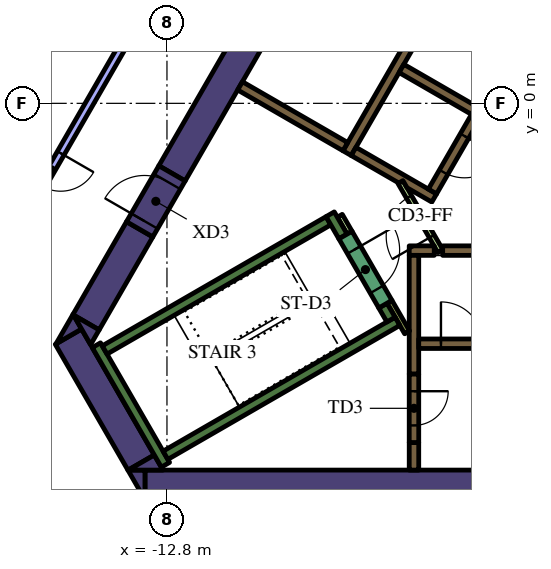
"""IFC4 building model, lengths in metres.
Left out: names, types, materials, properties, quantities, classifications, styles, units other than length and angle.
Written with IfcOpenShell. Run it as: python <this file> out.ifc"""

import sys

from ifc_helpers import new_model, si_unit, direction, frame, frame_2d, origin, place, context, subcontext, project, spatial, polyline, rectangle, outline, extrude, element, fill, save


model = new_model("IFC4")
c1 = context("Model", 3, precision=1e-05, world=origin(), true_north=direction((0.0, 1.0)))
c2 = subcontext(c1, "Body", "Model", "MODEL_VIEW")
j1 = project(units=[si_unit("LENGTHUNIT", "METRE"), si_unit("PLANEANGLEUNIT", "RADIAN")], contexts=[c1])
p1 = place(None, origin())
s1 = spatial("IfcSite", under=j1, at=p1, CompositionType="ELEMENT")
p2 = place(p1, origin())
s2 = spatial("IfcBuilding", under=s1, at=p2, CompositionType="ELEMENT")
p3 = place(p2, frame((0.0, 0.0, 171.0)))
s3 = spatial("IfcBuildingStorey", under=s2, at=p3, CompositionType="ELEMENT", Elevation=171.0)
p4 = place(p3, frame((-13.378, -10.05, 0.0), z_axis=(0.0, 0.0, 1.0), x_axis=(1.0, 0.0, 0.0)))
e1 = element("IfcWall", 1, at=p4, inside=s3, PredefinedType="SOLIDWALL", context=c2, shape_type="SweptSolid", body=[
    extrude(rectangle(XDim=22.282, YDim=0.8, at=frame_2d((11.141, 0.0))), origin(), (0.0, 0.0, 1.0), 4.2),
])
p5 = place(p3, origin())
e2 = element("IfcWall", 2, at=p5, inside=s3, PredefinedType="SOLIDWALL", context=c2, shape_type="SweptSolid", body=[
    extrude(outline(polyline([(-13.828, -9.65), (-13.38, -9.65), (-13.38, -10.426), (-13.828, -9.65)])), origin(), (0.0, 0.0, 1.0), 4.2),
])
p6 = place(p3, frame((-15.392, -6.14, 0.0), z_axis=(0.0, 0.0, 1.0), x_axis=(0.499984020225, -0.866034629516, 0.0)))
e3 = element("IfcWall", 3, at=p6, inside=s3, PredefinedType="SOLIDWALL", context=c2, shape_type="SweptSolid", body=[
    extrude(rectangle(XDim=3.824, YDim=0.8, at=frame_2d((1.912, 0.0))), origin(), (0.0, 0.0, 1.0), 4.2),
])
e4 = element("IfcWall", 4, at=p5, inside=s3, PredefinedType="SOLIDWALL", context=c2, shape_type="SweptSolid", body=[
    extrude(outline(polyline([(-15.047, -5.938), (-15.719, -6.326), (-15.271, -5.55), (-15.047, -5.938)])), origin(), (0.0, 0.0, 1.0), 4.2),
])
e5 = element("IfcWall", 5, at=p5, inside=s3, PredefinedType="SOLIDWALL", context=c2, shape_type="SweptSolid", body=[
    extrude(outline(polyline([(-12.904, -9.65), (-13.82, -9.65), (-13.133, -9.253), (-12.904, -9.65)])), origin(), (0.0, 0.0, 1.0), 4.2),
])
p7 = place(p3, frame((-13.518, -3.314, 0.0), z_axis=(0.0, 0.0, 1.0), x_axis=(-0.499969377405, -0.866043083026, 0.0)))
e6 = element("IfcWall", 6, at=p7, inside=s3, PredefinedType="SOLIDWALL", context=c2, shape_type="SweptSolid", body=[
    extrude(rectangle(XDim=2.824, YDim=0.8, at=frame_2d((1.412, 0.0))), origin(), (0.0, 0.0, 1.0), 4.2),
])
e7 = element("IfcWall", 7, at=p5, inside=s3, PredefinedType="SOLIDWALL", context=c2, shape_type="SweptSolid", body=[
    extrude(outline(polyline([(-14.809, -6.35), (-15.257, -5.574), (-14.585, -5.962), (-14.809, -6.35)])), origin(), (0.0, 0.0, 1.0), 4.2),
])
p8 = place(p3, frame((-12.668, -1.842, 0.0), z_axis=(0.0, 0.0, 1.0), x_axis=(0.500003640647, 0.866023301845, 0.0)))
e8 = element("IfcWall", 8, at=p8, inside=s3, PredefinedType="SOLIDWALL", context=c2, shape_type="SweptSolid", body=[
    extrude(rectangle(XDim=15.858, YDim=0.8, at=frame_2d((7.929, 0.0))), origin(), (0.0, 0.0, 1.0), 4.2),
])
p9 = place(p3, frame((-12.84, -9.511, 0.0), z_axis=(0.0, 0.0, 1.0), x_axis=(-0.499997733992, 0.866026712061, 0.0)))
e9 = element("IfcWall", 9, at=p9, inside=s3, PredefinedType="SOLIDWALL", context=c2, shape_type="SweptSolid", body=[
    extrude(rectangle(XDim=3.634, YDim=0.25, at=frame_2d((1.817, 0.0))), origin(), (0.0, 0.0, 1.0), 4.2),
])
p10 = place(p3, frame((-14.44, -6.49, 0.0), z_axis=(0.0, 0.0, 1.0), x_axis=(0.866022966069, 0.500004222222, 0.0)))
e10 = element("IfcWall", 10, at=p10, inside=s3, PredefinedType="SOLIDWALL", context=c2, shape_type="SweptSolid", body=[
    extrude(rectangle(XDim=6.8, YDim=0.25, at=frame_2d((3.4, 0.0))), origin(), (0.0, 0.0, 1.0), 4.2),
])
p11 = place(p3, frame((-8.168, -3.503, 0.0), z_axis=(0.0, 0.0, 1.0), x_axis=(-0.499952099219, 0.866053057547, 0.0)))
e11 = element("IfcWall", 11, at=p11, inside=s3, PredefinedType="SOLIDWALL", context=c2, shape_type="SweptSolid", body=[
    extrude(rectangle(XDim=0.675, YDim=0.25, at=frame_2d((0.337, 0.0))), origin(), (0.0, 0.0, 1.0), 4.2),
])
p12 = place(p3, frame((-12.84, -9.261, 0.0), z_axis=(0.0, 0.0, 1.0), x_axis=(0.866016039709, 0.500016218704, 0.0)))
e12 = element("IfcWall", 12, at=p12, inside=s3, PredefinedType="SOLIDWALL", context=c2, shape_type="SweptSolid", body=[
    extrude(rectangle(XDim=7.05, YDim=0.25, at=frame_2d((3.525, 0.0))), origin(), (0.0, 0.0, 1.0), 4.2),
])
p13 = place(p3, frame((-6.905, -5.69, 0.0), z_axis=(0.0, 0.0, 1.0), x_axis=(-0.500402024738, 0.865793170242, 0.0)))
e13 = element("IfcWall", 13, at=p13, inside=s3, PredefinedType="SOLIDWALL", context=c2, shape_type="SweptSolid", body=[
    extrude(rectangle(XDim=0.425, YDim=0.25, at=frame_2d((0.212, 0.0))), origin(), (0.0, 0.0, 1.0), 4.2),
])
p14 = place(p3, frame((-6.3, -8.925, 0.0), z_axis=(0.0, 0.0, 1.0), x_axis=(0.0, -1.0, 0.0)))
e14 = element("IfcWall", 14, at=p14, inside=s3, PredefinedType="SOLIDWALL", context=c2, shape_type="SweptSolid", body=[
    extrude(rectangle(XDim=0.725, YDim=0.25, at=frame_2d((0.363, 0.0))), origin(), (0.0, 0.0, 1.0), 4.2),
])
p15 = place(p3, frame((-5.545, -3.875, 0.0), z_axis=(0.0, 0.0, 1.0), x_axis=(1.0, 0.0, 0.0)))
e15 = element("IfcWall", 15, at=p15, inside=s3, PredefinedType="SOLIDWALL", context=c2, shape_type="SweptSolid", body=[
    extrude(rectangle(XDim=11.97, YDim=0.25, at=frame_2d((5.985, 0.0))), origin(), (0.0, 0.0, 1.0), 4.2),
])
p16 = place(p3, frame((-6.425, -3.875, 0.0), z_axis=(0.0, 0.0, 1.0), x_axis=(1.0, 0.0, 0.0)))
e16 = element("IfcWall", 16, at=p16, inside=s3, PredefinedType="SOLIDWALL", context=c2, shape_type="SweptSolid", body=[
    extrude(rectangle(XDim=0.658, YDim=0.25, at=frame_2d((0.329, 0.0))), origin(), (0.0, 0.0, 1.0), 4.2),
])
p17 = place(p3, frame((-6.3, -7.125, 0.0), z_axis=(0.0, 0.0, 1.0), x_axis=(0.0, 1.0, 0.0)))
e17 = element("IfcWall", 17, at=p17, inside=s3, PredefinedType="SOLIDWALL", context=c2, shape_type="SweptSolid", body=[
    extrude(rectangle(XDim=3.125, YDim=0.25, at=frame_2d((1.562, 0.0))), origin(), (0.0, 0.0, 1.0), 4.2),
])
p18 = place(p3, frame((-8.06, -1.311, 0.0), z_axis=(0.0, 0.0, 1.0), x_axis=(0.50000273126, 0.866023826885, 0.0)))
e18 = element("IfcWall", 18, at=p18, inside=s3, PredefinedType="SOLIDWALL", context=c2, shape_type="SweptSolid", body=[
    extrude(rectangle(XDim=10.33, YDim=0.25, at=frame_2d((5.165, 0.0))), origin(), (0.0, 0.0, 1.0), 4.2),
])
p19 = place(p3, frame((-4.724, -0.182, 0.0), z_axis=(0.0, 0.0, 1.0), x_axis=(-0.866008176907, 0.50002983664, 0.0)))
e19 = element("IfcWall", 19, at=p19, inside=s3, PredefinedType="SOLIDWALL", context=c2, shape_type="SweptSolid", body=[
    extrude(rectangle(XDim=2.2, YDim=0.25, at=frame_2d((1.1, 0.0))), origin(), (0.0, 0.0, 1.0), 4.2),
])
e20 = element("IfcWall", 20, at=p5, inside=s3, PredefinedType="SOLIDWALL", context=c2, shape_type="SweptSolid", body=[
    extrude(outline(polyline([(-5.922, -2.257), (-5.922, -2.257), (-5.705, -2.382), (-5.83, -2.598), (-6.483, -2.221), (-6.591, -2.033), (-6.591, -2.033), (-6.7, -2.096), (-7.952, -1.373), (-7.827, -1.156), (-5.922, -2.257)])), origin(), (0.0, 0.0, 1.0), 4.2),
])
p20 = place(p3, frame((-8.106, -1.14, 0.0), z_axis=(0.0, 0.0, 1.0), x_axis=(-0.866008981251, 0.500028443584, 0.0)))
e21 = element("IfcWall", 21, at=p20, inside=s3, PredefinedType="SOLIDWALL", context=c2, shape_type="SweptSolid", body=[
    extrude(rectangle(XDim=3.2, YDim=0.25, at=frame_2d((1.6, 0.0))), origin(), (0.0, 0.0, 1.0), 4.2),
])
p21 = place(p3, frame((-8.252, -2.958, 0.0), z_axis=(0.0, 0.0, 1.0), x_axis=(0.500174715838, -0.865924508047, 0.0)))
e22 = element("IfcWall", 22, at=p21, inside=s3, PredefinedType="PARTITIONING", context=c2, shape_type="SweptSolid", body=[
    extrude(rectangle(XDim=0.514, YDim=0.15, at=frame_2d((0.257, 0.0))), origin(), (0.0, 0.0, 1.0), 3.15),
])
p22 = place(p3, frame((-6.48, -6.027, 0.0), z_axis=(0.0, 0.0, 1.0), x_axis=(-0.499927229454, 0.866067413802, 0.0)))
e23 = element("IfcWall", 23, at=p22, inside=s3, PredefinedType="PARTITIONING", context=c2, shape_type="SweptSolid", body=[
    extrude(rectangle(XDim=0.929, YDim=0.15, at=frame_2d((0.464, 0.0))), origin(), (0.0, 0.0, 1.0), 4.2),
])
p23 = place(p3, frame((-6.175, -6.325, 0.0), z_axis=(0.0, 0.0, 1.0), x_axis=(1.0, 0.0, 0.0)))
e24 = element("IfcWall", 24, at=p23, inside=s3, PredefinedType="SOLIDWALL", context=c2, shape_type="SweptSolid", body=[
    extrude(rectangle(XDim=12.35, YDim=0.25, at=frame_2d((6.175, 0.0))), origin(), (0.0, 0.0, 1.0), 4.2),
])
p24 = place(p23, frame((0.585, 0.0, 0.0)))
e25 = element("IfcOpeningElement", 25, at=p24, cuts=e24, PredefinedType="OPENING", context=c2, shape_type="SweptSolid", body=[
    extrude(rectangle(XDim=1.1, YDim=2.1, at=frame_2d((0.55, 1.05))), frame((0.0, 0.135, 0.0), z_axis=(0.0, -1.0, 0.0), x_axis=(1.0, 0.0, 0.0)), (0.0, 0.0, 1.0), 0.27),
])
p25 = place(p23, frame((3.105, 0.0, 0.0)))
e26 = element("IfcOpeningElement", 26, at=p25, cuts=e24, PredefinedType="OPENING", context=c2, shape_type="SweptSolid", body=[
    extrude(rectangle(XDim=1.1, YDim=2.1, at=frame_2d((0.55, 1.05))), frame((0.0, 0.135, 0.0), z_axis=(0.0, -1.0, 0.0), x_axis=(1.0, 0.0, 0.0)), (0.0, 0.0, 1.0), 0.27),
])
p26 = place(p23, frame((5.625, 0.0, 0.0)))
e27 = element("IfcOpeningElement", 27, at=p26, cuts=e24, PredefinedType="OPENING", context=c2, shape_type="SweptSolid", body=[
    extrude(rectangle(XDim=1.1, YDim=2.1, at=frame_2d((0.55, 1.05))), frame((0.0, 0.135, 0.0), z_axis=(0.0, -1.0, 0.0), x_axis=(1.0, 0.0, 0.0)), (0.0, 0.0, 1.0), 0.27),
])
p27 = place(p23, frame((8.145, 0.0, 0.0)))
e28 = element("IfcOpeningElement", 28, at=p27, cuts=e24, PredefinedType="OPENING", context=c2, shape_type="SweptSolid", body=[
    extrude(rectangle(XDim=1.1, YDim=2.1, at=frame_2d((0.55, 1.05))), frame((0.0, 0.135, 0.0), z_axis=(0.0, -1.0, 0.0), x_axis=(1.0, 0.0, 0.0)), (0.0, 0.0, 1.0), 0.27),
])
p28 = place(p23, frame((10.665, 0.0, 0.0)))
e29 = element("IfcOpeningElement", 29, at=p28, cuts=e24, PredefinedType="OPENING", context=c2, shape_type="SweptSolid", body=[
    extrude(rectangle(XDim=1.1, YDim=2.1, at=frame_2d((0.55, 1.05))), frame((0.0, 0.135, 0.0), z_axis=(0.0, -1.0, 0.0), x_axis=(1.0, 0.0, 0.0)), (0.0, 0.0, 1.0), 0.27),
])
p29 = place(p3, frame((-0.898, 6.194, 0.0), z_axis=(0.0, 0.0, 1.0), x_axis=(-0.499996202215, -0.866027596426, 0.0)))
e30 = element("IfcWall", 30, at=p29, inside=s3, PredefinedType="SOLIDWALL", context=c2, shape_type="SweptSolid", body=[
    extrude(rectangle(XDim=9.83, YDim=0.25, at=frame_2d((4.915, 0.0))), origin(), (0.0, 0.0, 1.0), 4.2),
])
p30 = place(p29, frame((0.585, 0.0, 0.0)))
e31 = element("IfcOpeningElement", 31, at=p30, cuts=e30, PredefinedType="OPENING", context=c2, shape_type="SweptSolid", body=[
    extrude(rectangle(XDim=1.1, YDim=2.1, at=frame_2d((0.55, 1.05))), frame((0.0, 0.135, 0.0), z_axis=(0.0, -1.0, 0.0), x_axis=(1.0, 0.0, 0.0)), (0.0, 0.0, 1.0), 0.27),
])
p31 = place(p29, frame((3.105, 0.0, 0.0)))
e32 = element("IfcOpeningElement", 32, at=p31, cuts=e30, PredefinedType="OPENING", context=c2, shape_type="SweptSolid", body=[
    extrude(rectangle(XDim=1.1, YDim=2.1, at=frame_2d((0.55, 1.05))), frame((0.0, 0.135, 0.0), z_axis=(0.0, -1.0, 0.0), x_axis=(1.0, 0.0, 0.0)), (0.0, 0.0, 1.0), 0.27),
])
p32 = place(p29, frame((5.625, 0.0, 0.0)))
e33 = element("IfcOpeningElement", 33, at=p32, cuts=e30, PredefinedType="OPENING", context=c2, shape_type="SweptSolid", body=[
    extrude(rectangle(XDim=1.1, YDim=2.1, at=frame_2d((0.55, 1.05))), frame((0.0, 0.135, 0.0), z_axis=(0.0, -1.0, 0.0), x_axis=(1.0, 0.0, 0.0)), (0.0, 0.0, 1.0), 0.27),
])
p33 = place(p29, frame((8.145, 0.0, 0.0)))
e34 = element("IfcOpeningElement", 34, at=p33, cuts=e30, PredefinedType="OPENING", context=c2, shape_type="SweptSolid", body=[
    extrude(rectangle(XDim=1.1, YDim=2.1, at=frame_2d((0.55, 1.05))), frame((0.0, 0.135, 0.0), z_axis=(0.0, -1.0, 0.0), x_axis=(1.0, 0.0, 0.0)), (0.0, 0.0, 1.0), 0.27),
])
p34 = place(p3, frame((-8.103, -3.466, 0.0), z_axis=(0.0, 0.0, 1.0), x_axis=(0.500078061341, -0.865980330357, 0.0)))
e35 = element("IfcWall", 35, at=p34, inside=s3, PredefinedType="SOLIDWALL", context=c2, shape_type="SweptSolid", body=[
    extrude(rectangle(XDim=2.1, YDim=0.4, at=frame_2d((1.05, 0.0))), origin(), (0.0, 0.0, 1.0), 4.2),
])
p35 = place(p34, frame((0.45, 0.0, 0.0)))
e36 = element("IfcOpeningElement", 36, at=p35, cuts=e35, PredefinedType="OPENING", context=c2, shape_type="SweptSolid", body=[
    extrude(rectangle(XDim=1.2, YDim=2.1, at=frame_2d((0.6, 1.05))), frame((0.0, 0.21, 0.0), z_axis=(0.0, -1.0, 0.0), x_axis=(1.0, 0.0, 0.0)), (0.0, 0.0, 1.0), 0.42),
])
p36 = place(p3, frame((-6.3, -7.125, 0.0), z_axis=(0.0, 0.0, 1.0), x_axis=(0.0, -1.0, 0.0)))
e37 = element("IfcWall", 37, at=p36, inside=s3, PredefinedType="SOLIDWALL", context=c2, shape_type="SweptSolid", body=[
    extrude(rectangle(XDim=1.8, YDim=0.25, at=frame_2d((0.9, 0.0))), origin(), (0.0, 0.0, 1.0), 4.2),
])
p37 = place(p36, frame((0.45, 0.0, 0.0)))
e38 = element("IfcOpeningElement", 38, at=p37, cuts=e37, PredefinedType="OPENING", context=c2, shape_type="SweptSolid", body=[
    extrude(rectangle(XDim=0.9, YDim=2.1, at=frame_2d((0.45, 1.05))), frame((0.0, 0.135, 0.0), z_axis=(0.0, -1.0, 0.0), x_axis=(1.0, 0.0, 0.0)), (0.0, 0.0, 1.0), 0.27),
])
p38 = place(p3, frame((-5.606, -3.89, 0.0), z_axis=(0.0, 0.0, 1.0), x_axis=(-0.500027713859, 0.866009402589, 0.0)))
e39 = element("IfcWall", 39, at=p38, inside=s3, PredefinedType="PARTITIONING", context=c2, shape_type="SweptSolid", body=[
    extrude(rectangle(XDim=2.1, YDim=0.15, at=frame_2d((1.05, 0.0))), origin(), (0.0, 0.0, 1.0), 3.15),
])
p39 = place(p38, frame((0.45, 0.0, 0.0)))
e40 = element("IfcOpeningElement", 40, at=p39, cuts=e39, PredefinedType="OPENING", context=c2, shape_type="SweptSolid", body=[
    extrude(rectangle(XDim=1.2, YDim=2.1, at=frame_2d((0.6, 1.05))), frame((0.0, 0.085, 0.0), z_axis=(0.0, -1.0, 0.0), x_axis=(1.0, 0.0, 0.0)), (0.0, 0.0, 1.0), 0.17),
])
p40 = place(p3, frame((-13.518, -3.314, 0.0), z_axis=(0.0, 0.0, 1.0), x_axis=(0.500000056704, 0.866025371046, 0.0)))
e41 = element("IfcWall", 41, at=p40, inside=s3, PredefinedType="SOLIDWALL", context=c2, shape_type="SweptSolid", body=[
    extrude(rectangle(XDim=1.7, YDim=0.8, at=frame_2d((0.85, 0.0))), origin(), (0.0, 0.0, 1.0), 4.2),
])
p41 = place(p40, frame((0.25, 0.0, 0.0)))
e42 = element("IfcOpeningElement", 42, at=p41, cuts=e41, PredefinedType="OPENING", context=c2, shape_type="SweptSolid", body=[
    extrude(rectangle(XDim=1.2, YDim=2.1, at=frame_2d((0.6, 1.05))), frame((0.0, 0.41, 0.0), z_axis=(0.0, -1.0, 0.0), x_axis=(1.0, 0.0, 0.0)), (0.0, 0.0, 1.0), 0.82),
])
p42 = place(p3, frame((-13.146, 2.931, 0.0), z_axis=(0.0, 0.0, 1.0), x_axis=(-0.499997861235, -0.866026638597, 0.0)))
e43 = element("IfcWall", 43, at=p42, inside=s3, PredefinedType="PARTITIONING", context=c2, shape_type="SweptSolid", body=[
    extrude(rectangle(XDim=10.717, YDim=0.2, at=frame_2d((5.359, 0.0))), origin(), (0.0, 0.0, 1.0), 3.15),
])
p43 = place(p42, frame((4.9, 0.0, 0.0)))
e44 = element("IfcOpeningElement", 44, at=p43, cuts=e43, PredefinedType="OPENING", context=c2, shape_type="SweptSolid", body=[
    extrude(rectangle(XDim=1.0, YDim=2.1, at=frame_2d((0.5, 1.05))), frame((0.0, 0.11, 0.0), z_axis=(0.0, -1.0, 0.0), x_axis=(1.0, 0.0, 0.0)), (0.0, 0.0, 1.0), 0.22),
])
p44 = place(p3, frame((-18.489, -6.376, 0.0), z_axis=(0.0, 0.0, 1.0), x_axis=(0.499989401968, -0.866031522475, 0.0)))
e45 = element("IfcWall", 45, at=p44, inside=s3, PredefinedType="PARTITIONING", context=c2, shape_type="SweptSolid", body=[
    extrude(rectangle(XDim=6.677, YDim=0.2, at=frame_2d((3.338, 0.0))), origin(), (0.0, 0.0, 1.0), 3.15),
])
p45 = place(p24, origin())
e46 = element("IfcDoor", 46, at=p45, inside=s3, OperationType="DOUBLE_DOOR_SLIDING", PredefinedType="DOOR", context=c2, shape_type="SweptSolid", body=[
    extrude(rectangle(XDim=1.1, YDim=2.1, at=frame_2d((0.55, 1.05))), frame((0.0, 0.025, 0.0), z_axis=(0.0, -1.0, 0.0), x_axis=(1.0, 0.0, 0.0)), (0.0, 0.0, 1.0), 0.05),
])
fill(e25, e46)
p46 = place(p33, origin())
e47 = element("IfcDoor", 47, at=p46, inside=s3, OperationType="DOUBLE_DOOR_SLIDING", PredefinedType="DOOR", context=c2, shape_type="SweptSolid", body=[
    extrude(rectangle(XDim=1.1, YDim=2.1, at=frame_2d((0.55, 1.05))), frame((0.0, 0.025, 0.0), z_axis=(0.0, -1.0, 0.0), x_axis=(1.0, 0.0, 0.0)), (0.0, 0.0, 1.0), 0.05),
])
fill(e34, e47)
p47 = place(p35, origin())
e48 = element("IfcDoor", 48, at=p47, inside=s3, OperationType="SINGLE_SWING_LEFT", PredefinedType="DOOR", context=c2, shape_type="SweptSolid", body=[
    extrude(rectangle(XDim=1.2, YDim=2.1, at=frame_2d((0.6, 1.05))), frame((0.0, 0.025, 0.0), z_axis=(0.0, -1.0, 0.0), x_axis=(1.0, 0.0, 0.0)), (0.0, 0.0, 1.0), 0.05),
])
fill(e36, e48)
p48 = place(p37, origin())
e49 = element("IfcDoor", 49, at=p48, inside=s3, OperationType="SINGLE_SWING_LEFT", PredefinedType="DOOR", context=c2, shape_type="SweptSolid", body=[
    extrude(rectangle(XDim=0.9, YDim=2.1, at=frame_2d((0.45, 1.05))), frame((0.0, 0.025, 0.0), z_axis=(0.0, -1.0, 0.0), x_axis=(1.0, 0.0, 0.0)), (0.0, 0.0, 1.0), 0.05),
])
fill(e38, e49)
p49 = place(p39, origin())
e50 = element("IfcDoor", 50, at=p49, inside=s3, OperationType="SINGLE_SWING_LEFT", PredefinedType="DOOR", context=c2, shape_type="SweptSolid", body=[
    extrude(rectangle(XDim=1.2, YDim=2.1, at=frame_2d((0.6, 1.05))), frame((0.0, 0.025, 0.0), z_axis=(0.0, -1.0, 0.0), x_axis=(1.0, 0.0, 0.0)), (0.0, 0.0, 1.0), 0.05),
])
fill(e40, e50)
p50 = place(p41, origin())
e51 = element("IfcDoor", 51, at=p50, inside=s3, OperationType="SINGLE_SWING_LEFT", PredefinedType="DOOR", context=c2, shape_type="SweptSolid", body=[
    extrude(rectangle(XDim=1.2, YDim=2.1, at=frame_2d((0.6, 1.05))), frame((0.0, 0.025, 0.0), z_axis=(0.0, -1.0, 0.0), x_axis=(1.0, 0.0, 0.0)), (0.0, 0.0, 1.0), 0.05),
])
fill(e42, e51)
p51 = place(p43, origin())
e52 = element("IfcDoor", 52, at=p51, inside=s3, OperationType="SINGLE_SWING_RIGHT", PredefinedType="DOOR", context=c2, shape_type="SweptSolid", body=[
    extrude(rectangle(XDim=1.0, YDim=2.1, at=frame_2d((0.5, 1.05))), frame((0.0, 0.025, 0.0), z_axis=(0.0, -1.0, 0.0), x_axis=(1.0, 0.0, 0.0)), (0.0, 0.0, 1.0), 0.05),
])
fill(e44, e52)
save(model, sys.argv[1])
